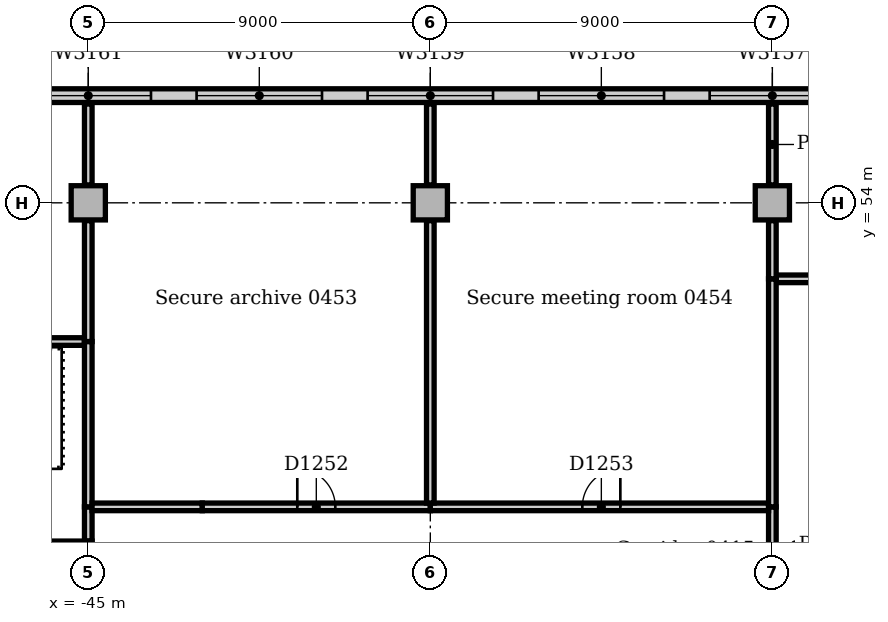
"""IFC4 building model, lengths in metres.
Left out: names, types, materials, properties, quantities, classifications, styles, units other than length and angle.
Written with IfcOpenShell. Run it as: python <this file> out.ifc"""

import sys

from ifc_helpers import new_model, si_unit, direction, frame, frame_2d, origin, origin_2d, place, context, subcontext, project, spatial, rectangle, extrude, element, fill, save


model = new_model("IFC4")
c1 = context("Model", 3, precision=1e-05, world=origin(), true_north=direction((0.0, 1.0)))
c2 = subcontext(c1, "Body", "Model", "MODEL_VIEW")
j1 = project(units=[si_unit("LENGTHUNIT", "METRE"), si_unit("PLANEANGLEUNIT", "RADIAN")], contexts=[c1])
p1 = place(None, origin())
s1 = spatial("IfcSite", under=j1, at=p1, CompositionType="ELEMENT")
p2 = place(p1, origin())
s2 = spatial("IfcBuilding", under=s1, at=p2, CompositionType="ELEMENT")
p3 = place(p2, frame((0.0, 0.0, 21.0)))
s3 = spatial("IfcBuildingStorey", under=s2, at=p3, CompositionType="ELEMENT", Elevation=21.0)
for number, where, z_axis, x_axis in (
    (1, (-45.0, 54.0, 0.0), (0.0, 0.0, 1.0), (1.0, 0.0, 0.0)),
    (2, (-36.0, 54.0, 0.0), (0.0, 0.0, 1.0), (1.0, 0.0, 0.0)),
    (3, (-27.0, 54.0, 0.0), (0.0, 0.0, 1.0), (1.0, 0.0, 0.0)),
):
    element("IfcColumn", number, at=place(p3, frame(where, z_axis=z_axis, x_axis=x_axis)), inside=s3, PredefinedType="COLUMN", context=c2, shape_type="SweptSolid", body=[
        extrude(rectangle(XDim=0.9, YDim=0.9, at=origin_2d()), origin(), (0.0, 0.0, 1.0), 4.7),
    ])
p4 = place(p3, frame((63.0, 56.82, 0.0), z_axis=(0.0, 0.0, 1.0), x_axis=(-1.0, 0.0, 0.0)))
e4 = element("IfcWall", 4, at=p4, inside=s3, PredefinedType="STANDARD", context=c2, shape_type="SweptSolid", body=[
    extrude(rectangle(XDim=144.0, YDim=0.36, at=frame_2d((72.0, 0.0))), origin(), (0.0, 0.0, 1.0), 4.85),
])
p5 = place(p4, frame((2.85, 0.0, 0.9)))
e5 = element("IfcOpeningElement", 5, at=p5, cuts=e4, PredefinedType="OPENING", context=c2, shape_type="SweptSolid", body=[
    extrude(rectangle(XDim=3.3, YDim=2.4, at=frame_2d((1.65, 1.2))), frame((0.0, 0.19, 0.0), z_axis=(0.0, -1.0, 0.0), x_axis=(1.0, 0.0, 0.0)), (0.0, 0.0, 1.0), 0.38),
])
p6 = place(p4, frame((7.35, 0.0, 0.9)))
e6 = element("IfcOpeningElement", 6, at=p6, cuts=e4, PredefinedType="OPENING", context=c2, shape_type="SweptSolid", body=[
    extrude(rectangle(XDim=3.3, YDim=2.4, at=frame_2d((1.65, 1.2))), frame((0.0, 0.19, 0.0), z_axis=(0.0, -1.0, 0.0), x_axis=(1.0, 0.0, 0.0)), (0.0, 0.0, 1.0), 0.38),
])
p7 = place(p4, frame((11.85, 0.0, 0.9)))
e7 = element("IfcOpeningElement", 7, at=p7, cuts=e4, PredefinedType="OPENING", context=c2, shape_type="SweptSolid", body=[
    extrude(rectangle(XDim=3.3, YDim=2.4, at=frame_2d((1.65, 1.2))), frame((0.0, 0.19, 0.0), z_axis=(0.0, -1.0, 0.0), x_axis=(1.0, 0.0, 0.0)), (0.0, 0.0, 1.0), 0.38),
])
p8 = place(p4, frame((16.35, 0.0, 0.9)))
e8 = element("IfcOpeningElement", 8, at=p8, cuts=e4, PredefinedType="OPENING", context=c2, shape_type="SweptSolid", body=[
    extrude(rectangle(XDim=3.3, YDim=2.4, at=frame_2d((1.65, 1.2))), frame((0.0, 0.19, 0.0), z_axis=(0.0, -1.0, 0.0), x_axis=(1.0, 0.0, 0.0)), (0.0, 0.0, 1.0), 0.38),
])
p9 = place(p4, frame((20.85, 0.0, 0.9)))
e9 = element("IfcOpeningElement", 9, at=p9, cuts=e4, PredefinedType="OPENING", context=c2, shape_type="SweptSolid", body=[
    extrude(rectangle(XDim=3.3, YDim=2.4, at=frame_2d((1.65, 1.2))), frame((0.0, 0.19, 0.0), z_axis=(0.0, -1.0, 0.0), x_axis=(1.0, 0.0, 0.0)), (0.0, 0.0, 1.0), 0.38),
])
p10 = place(p4, frame((25.35, 0.0, 0.9)))
e10 = element("IfcOpeningElement", 10, at=p10, cuts=e4, PredefinedType="OPENING", context=c2, shape_type="SweptSolid", body=[
    extrude(rectangle(XDim=3.3, YDim=2.4, at=frame_2d((1.65, 1.2))), frame((0.0, 0.19, 0.0), z_axis=(0.0, -1.0, 0.0), x_axis=(1.0, 0.0, 0.0)), (0.0, 0.0, 1.0), 0.38),
])
p11 = place(p4, frame((29.85, 0.0, 0.9)))
e11 = element("IfcOpeningElement", 11, at=p11, cuts=e4, PredefinedType="OPENING", context=c2, shape_type="SweptSolid", body=[
    extrude(rectangle(XDim=3.3, YDim=2.4, at=frame_2d((1.65, 1.2))), frame((0.0, 0.19, 0.0), z_axis=(0.0, -1.0, 0.0), x_axis=(1.0, 0.0, 0.0)), (0.0, 0.0, 1.0), 0.38),
])
p12 = place(p4, frame((34.35, 0.0, 0.9)))
e12 = element("IfcOpeningElement", 12, at=p12, cuts=e4, PredefinedType="OPENING", context=c2, shape_type="SweptSolid", body=[
    extrude(rectangle(XDim=3.3, YDim=2.4, at=frame_2d((1.65, 1.2))), frame((0.0, 0.19, 0.0), z_axis=(0.0, -1.0, 0.0), x_axis=(1.0, 0.0, 0.0)), (0.0, 0.0, 1.0), 0.38),
])
p13 = place(p4, frame((38.85, 0.0, 0.9)))
e13 = element("IfcOpeningElement", 13, at=p13, cuts=e4, PredefinedType="OPENING", context=c2, shape_type="SweptSolid", body=[
    extrude(rectangle(XDim=3.3, YDim=2.4, at=frame_2d((1.65, 1.2))), frame((0.0, 0.19, 0.0), z_axis=(0.0, -1.0, 0.0), x_axis=(1.0, 0.0, 0.0)), (0.0, 0.0, 1.0), 0.38),
])
p14 = place(p4, frame((43.35, 0.0, 0.9)))
e14 = element("IfcOpeningElement", 14, at=p14, cuts=e4, PredefinedType="OPENING", context=c2, shape_type="SweptSolid", body=[
    extrude(rectangle(XDim=3.3, YDim=2.4, at=frame_2d((1.65, 1.2))), frame((0.0, 0.19, 0.0), z_axis=(0.0, -1.0, 0.0), x_axis=(1.0, 0.0, 0.0)), (0.0, 0.0, 1.0), 0.38),
])
p15 = place(p4, frame((47.85, 0.0, 0.9)))
e15 = element("IfcOpeningElement", 15, at=p15, cuts=e4, PredefinedType="OPENING", context=c2, shape_type="SweptSolid", body=[
    extrude(rectangle(XDim=3.3, YDim=2.4, at=frame_2d((1.65, 1.2))), frame((0.0, 0.19, 0.0), z_axis=(0.0, -1.0, 0.0), x_axis=(1.0, 0.0, 0.0)), (0.0, 0.0, 1.0), 0.38),
])
p16 = place(p4, frame((52.35, 0.0, 0.9)))
e16 = element("IfcOpeningElement", 16, at=p16, cuts=e4, PredefinedType="OPENING", context=c2, shape_type="SweptSolid", body=[
    extrude(rectangle(XDim=3.3, YDim=2.4, at=frame_2d((1.65, 1.2))), frame((0.0, 0.19, 0.0), z_axis=(0.0, -1.0, 0.0), x_axis=(1.0, 0.0, 0.0)), (0.0, 0.0, 1.0), 0.38),
])
p17 = place(p4, frame((56.85, 0.0, 0.9)))
e17 = element("IfcOpeningElement", 17, at=p17, cuts=e4, PredefinedType="OPENING", context=c2, shape_type="SweptSolid", body=[
    extrude(rectangle(XDim=3.3, YDim=2.4, at=frame_2d((1.65, 1.2))), frame((0.0, 0.19, 0.0), z_axis=(0.0, -1.0, 0.0), x_axis=(1.0, 0.0, 0.0)), (0.0, 0.0, 1.0), 0.38),
])
p18 = place(p4, frame((61.35, 0.0, 0.9)))
e18 = element("IfcOpeningElement", 18, at=p18, cuts=e4, PredefinedType="OPENING", context=c2, shape_type="SweptSolid", body=[
    extrude(rectangle(XDim=3.3, YDim=2.4, at=frame_2d((1.65, 1.2))), frame((0.0, 0.19, 0.0), z_axis=(0.0, -1.0, 0.0), x_axis=(1.0, 0.0, 0.0)), (0.0, 0.0, 1.0), 0.38),
])
p19 = place(p4, frame((65.85, 0.0, 0.9)))
e19 = element("IfcOpeningElement", 19, at=p19, cuts=e4, PredefinedType="OPENING", context=c2, shape_type="SweptSolid", body=[
    extrude(rectangle(XDim=3.3, YDim=2.4, at=frame_2d((1.65, 1.2))), frame((0.0, 0.19, 0.0), z_axis=(0.0, -1.0, 0.0), x_axis=(1.0, 0.0, 0.0)), (0.0, 0.0, 1.0), 0.38),
])
p20 = place(p4, frame((70.35, 0.0, 0.9)))
e20 = element("IfcOpeningElement", 20, at=p20, cuts=e4, PredefinedType="OPENING", context=c2, shape_type="SweptSolid", body=[
    extrude(rectangle(XDim=3.3, YDim=2.4, at=frame_2d((1.65, 1.2))), frame((0.0, 0.19, 0.0), z_axis=(0.0, -1.0, 0.0), x_axis=(1.0, 0.0, 0.0)), (0.0, 0.0, 1.0), 0.38),
])
p21 = place(p4, frame((74.85, 0.0, 0.9)))
e21 = element("IfcOpeningElement", 21, at=p21, cuts=e4, PredefinedType="OPENING", context=c2, shape_type="SweptSolid", body=[
    extrude(rectangle(XDim=3.3, YDim=2.4, at=frame_2d((1.65, 1.2))), frame((0.0, 0.19, 0.0), z_axis=(0.0, -1.0, 0.0), x_axis=(1.0, 0.0, 0.0)), (0.0, 0.0, 1.0), 0.38),
])
p22 = place(p4, frame((79.35, 0.0, 0.9)))
e22 = element("IfcOpeningElement", 22, at=p22, cuts=e4, PredefinedType="OPENING", context=c2, shape_type="SweptSolid", body=[
    extrude(rectangle(XDim=3.3, YDim=2.4, at=frame_2d((1.65, 1.2))), frame((0.0, 0.19, 0.0), z_axis=(0.0, -1.0, 0.0), x_axis=(1.0, 0.0, 0.0)), (0.0, 0.0, 1.0), 0.38),
])
p23 = place(p4, frame((83.85, 0.0, 0.9)))
e23 = element("IfcOpeningElement", 23, at=p23, cuts=e4, PredefinedType="OPENING", context=c2, shape_type="SweptSolid", body=[
    extrude(rectangle(XDim=3.3, YDim=2.4, at=frame_2d((1.65, 1.2))), frame((0.0, 0.19, 0.0), z_axis=(0.0, -1.0, 0.0), x_axis=(1.0, 0.0, 0.0)), (0.0, 0.0, 1.0), 0.38),
])
p24 = place(p4, frame((88.35, 0.0, 0.9)))
e24 = element("IfcOpeningElement", 24, at=p24, cuts=e4, PredefinedType="OPENING", context=c2, shape_type="SweptSolid", body=[
    extrude(rectangle(XDim=3.3, YDim=2.4, at=frame_2d((1.65, 1.2))), frame((0.0, 0.19, 0.0), z_axis=(0.0, -1.0, 0.0), x_axis=(1.0, 0.0, 0.0)), (0.0, 0.0, 1.0), 0.38),
])
p25 = place(p4, frame((92.85, 0.0, 0.9)))
e25 = element("IfcOpeningElement", 25, at=p25, cuts=e4, PredefinedType="OPENING", context=c2, shape_type="SweptSolid", body=[
    extrude(rectangle(XDim=3.3, YDim=2.4, at=frame_2d((1.65, 1.2))), frame((0.0, 0.19, 0.0), z_axis=(0.0, -1.0, 0.0), x_axis=(1.0, 0.0, 0.0)), (0.0, 0.0, 1.0), 0.38),
])
p26 = place(p4, frame((97.35, 0.0, 0.9)))
e26 = element("IfcOpeningElement", 26, at=p26, cuts=e4, PredefinedType="OPENING", context=c2, shape_type="SweptSolid", body=[
    extrude(rectangle(XDim=3.3, YDim=2.4, at=frame_2d((1.65, 1.2))), frame((0.0, 0.19, 0.0), z_axis=(0.0, -1.0, 0.0), x_axis=(1.0, 0.0, 0.0)), (0.0, 0.0, 1.0), 0.38),
])
p27 = place(p4, frame((101.85, 0.0, 0.9)))
e27 = element("IfcOpeningElement", 27, at=p27, cuts=e4, PredefinedType="OPENING", context=c2, shape_type="SweptSolid", body=[
    extrude(rectangle(XDim=3.3, YDim=2.4, at=frame_2d((1.65, 1.2))), frame((0.0, 0.19, 0.0), z_axis=(0.0, -1.0, 0.0), x_axis=(1.0, 0.0, 0.0)), (0.0, 0.0, 1.0), 0.38),
])
p28 = place(p4, frame((106.35, 0.0, 0.9)))
e28 = element("IfcOpeningElement", 28, at=p28, cuts=e4, PredefinedType="OPENING", context=c2, shape_type="SweptSolid", body=[
    extrude(rectangle(XDim=3.3, YDim=2.4, at=frame_2d((1.65, 1.2))), frame((0.0, 0.19, 0.0), z_axis=(0.0, -1.0, 0.0), x_axis=(1.0, 0.0, 0.0)), (0.0, 0.0, 1.0), 0.38),
])
p29 = place(p4, frame((110.85, 0.0, 0.9)))
e29 = element("IfcOpeningElement", 29, at=p29, cuts=e4, PredefinedType="OPENING", context=c2, shape_type="SweptSolid", body=[
    extrude(rectangle(XDim=3.3, YDim=2.4, at=frame_2d((1.65, 1.2))), frame((0.0, 0.19, 0.0), z_axis=(0.0, -1.0, 0.0), x_axis=(1.0, 0.0, 0.0)), (0.0, 0.0, 1.0), 0.38),
])
p30 = place(p4, frame((115.35, 0.0, 0.9)))
e30 = element("IfcOpeningElement", 30, at=p30, cuts=e4, PredefinedType="OPENING", context=c2, shape_type="SweptSolid", body=[
    extrude(rectangle(XDim=3.3, YDim=2.4, at=frame_2d((1.65, 1.2))), frame((0.0, 0.19, 0.0), z_axis=(0.0, -1.0, 0.0), x_axis=(1.0, 0.0, 0.0)), (0.0, 0.0, 1.0), 0.38),
])
p31 = place(p4, frame((119.85, 0.0, 0.9)))
e31 = element("IfcOpeningElement", 31, at=p31, cuts=e4, PredefinedType="OPENING", context=c2, shape_type="SweptSolid", body=[
    extrude(rectangle(XDim=3.3, YDim=2.4, at=frame_2d((1.65, 1.2))), frame((0.0, 0.19, 0.0), z_axis=(0.0, -1.0, 0.0), x_axis=(1.0, 0.0, 0.0)), (0.0, 0.0, 1.0), 0.38),
])
p32 = place(p4, frame((124.35, 0.0, 0.9)))
e32 = element("IfcOpeningElement", 32, at=p32, cuts=e4, PredefinedType="OPENING", context=c2, shape_type="SweptSolid", body=[
    extrude(rectangle(XDim=3.3, YDim=2.4, at=frame_2d((1.65, 1.2))), frame((0.0, 0.19, 0.0), z_axis=(0.0, -1.0, 0.0), x_axis=(1.0, 0.0, 0.0)), (0.0, 0.0, 1.0), 0.38),
])
p33 = place(p4, frame((128.85, 0.0, 0.9)))
e33 = element("IfcOpeningElement", 33, at=p33, cuts=e4, PredefinedType="OPENING", context=c2, shape_type="SweptSolid", body=[
    extrude(rectangle(XDim=3.3, YDim=2.4, at=frame_2d((1.65, 1.2))), frame((0.0, 0.19, 0.0), z_axis=(0.0, -1.0, 0.0), x_axis=(1.0, 0.0, 0.0)), (0.0, 0.0, 1.0), 0.38),
])
p34 = place(p4, frame((133.35, 0.0, 0.9)))
e34 = element("IfcOpeningElement", 34, at=p34, cuts=e4, PredefinedType="OPENING", context=c2, shape_type="SweptSolid", body=[
    extrude(rectangle(XDim=3.3, YDim=2.4, at=frame_2d((1.65, 1.2))), frame((0.0, 0.19, 0.0), z_axis=(0.0, -1.0, 0.0), x_axis=(1.0, 0.0, 0.0)), (0.0, 0.0, 1.0), 0.38),
])
p35 = place(p4, frame((137.85, 0.0, 0.9)))
e35 = element("IfcOpeningElement", 35, at=p35, cuts=e4, PredefinedType="OPENING", context=c2, shape_type="SweptSolid", body=[
    extrude(rectangle(XDim=3.3, YDim=2.4, at=frame_2d((1.65, 1.2))), frame((0.0, 0.19, 0.0), z_axis=(0.0, -1.0, 0.0), x_axis=(1.0, 0.0, 0.0)), (0.0, 0.0, 1.0), 0.38),
])
p36 = place(p3, frame((-45.0, 45.1, 0.0), z_axis=(0.0, 0.0, 1.0), x_axis=(0.0, 1.0, 0.0)))
e36 = element("IfcWall", 36, at=p36, inside=s3, PredefinedType="SOLIDWALL", context=c2, shape_type="SweptSolid", body=[
    extrude(rectangle(XDim=0.9, YDim=0.2, at=frame_2d((0.45, 0.0))), origin(), (0.0, 0.0, 1.0), 4.7),
])
p37 = place(p3, frame((-54.0, 45.0, 0.0), z_axis=(0.0, 0.0, 1.0), x_axis=(1.0, 0.0, 0.0)))
e37 = element("IfcWall", 37, at=p37, inside=s3, PredefinedType="SOLIDWALL", context=c2, shape_type="SweptSolid", body=[
    extrude(rectangle(XDim=9.1, YDim=0.2, at=frame_2d((4.55, 0.0))), origin(), (0.0, 0.0, 1.0), 4.85),
])
p38 = place(p37, frame((0.8, 0.0, 0.0)))
e38 = element("IfcOpeningElement", 38, at=p38, cuts=e37, PredefinedType="OPENING", context=c2, shape_type="SweptSolid", body=[
    extrude(rectangle(XDim=1.2, YDim=2.1, at=frame_2d((0.6, 1.05))), frame((0.0, 0.11, 0.0), z_axis=(0.0, -1.0, 0.0), x_axis=(1.0, 0.0, 0.0)), (0.0, 0.0, 1.0), 0.22),
])
p39 = place(p3, frame((-54.1, 50.35, 0.0), z_axis=(0.0, 0.0, 1.0), x_axis=(1.0, 0.0, 0.0)))
e39 = element("IfcWall", 39, at=p39, inside=s3, PredefinedType="SOLIDWALL", context=c2, shape_type="SweptSolid", body=[
    extrude(rectangle(XDim=9.0, YDim=0.2, at=frame_2d((4.5, 0.0))), origin(), (0.0, 0.0, 1.0), 4.7),
])
p40 = place(p3, frame((-45.0, 46.0, 0.0), z_axis=(0.0, 0.0, 1.0), x_axis=(0.0, 1.0, 0.0)))
e40 = element("IfcWall", 40, at=p40, inside=s3, PredefinedType="SOLIDWALL", context=c2, shape_type="SweptSolid", body=[
    extrude(rectangle(XDim=4.35, YDim=0.2, at=frame_2d((2.175, 0.0))), origin(), (0.0, 0.0, 1.0), 4.7),
])
p41 = place(p3, frame((-44.9, 46.0, 0.0), z_axis=(0.0, 0.0, 1.0), x_axis=(1.0, 0.0, 0.0)))
e41 = element("IfcWall", 41, at=p41, inside=s3, PredefinedType="PARTITIONING", context=c2, shape_type="SweptSolid", body=[
    extrude(rectangle(XDim=2.9, YDim=0.2, at=frame_2d((1.45, 0.0))), origin(), (0.0, 0.0, 1.0), 4.7),
])
p42 = place(p3, frame((-27.0, 45.0, 0.0), z_axis=(0.0, 0.0, 1.0), x_axis=(0.0, 1.0, 0.0)))
e42 = element("IfcWall", 42, at=p42, inside=s3, PredefinedType="PARTITIONING", context=c2, shape_type="SweptSolid", body=[
    extrude(rectangle(XDim=1.0, YDim=0.2, at=frame_2d((0.5, 0.0))), origin(), (0.0, 0.0, 1.0), 4.7),
])
p43 = place(p3, frame((-42.0, 46.0, 0.0), z_axis=(0.0, 0.0, 1.0), x_axis=(1.0, 0.0, 0.0)))
e43 = element("IfcWall", 43, at=p43, inside=s3, PredefinedType="PARTITIONING", context=c2, shape_type="SweptSolid", body=[
    extrude(rectangle(XDim=6.0, YDim=0.2, at=frame_2d((3.0, 0.0))), origin(), (0.0, 0.0, 1.0), 4.7),
])
p44 = place(p43, frame((2.5, 0.0, 0.0)))
e44 = element("IfcOpeningElement", 44, at=p44, cuts=e43, PredefinedType="OPENING", context=c2, shape_type="SweptSolid", body=[
    extrude(rectangle(XDim=1.0, YDim=2.1, at=frame_2d((0.5, 1.05))), frame((0.0, 0.11, 0.0), z_axis=(0.0, -1.0, 0.0), x_axis=(1.0, 0.0, 0.0)), (0.0, 0.0, 1.0), 0.22),
])
p45 = place(p3, frame((-36.0, 46.0, 0.0), z_axis=(0.0, 0.0, 1.0), x_axis=(1.0, 0.0, 0.0)))
e45 = element("IfcWall", 45, at=p45, inside=s3, PredefinedType="PARTITIONING", context=c2, shape_type="SweptSolid", body=[
    extrude(rectangle(XDim=8.9, YDim=0.2, at=frame_2d((4.45, 0.0))), origin(), (0.0, 0.0, 1.0), 4.7),
])
p46 = place(p45, frame((4.0, 0.0, 0.0)))
e46 = element("IfcOpeningElement", 46, at=p46, cuts=e45, PredefinedType="OPENING", context=c2, shape_type="SweptSolid", body=[
    extrude(rectangle(XDim=1.0, YDim=2.1, at=frame_2d((0.5, 1.05))), frame((0.0, 0.11, 0.0), z_axis=(0.0, -1.0, 0.0), x_axis=(1.0, 0.0, 0.0)), (0.0, 0.0, 1.0), 0.22),
])
p47 = place(p3, frame((-26.9, 52.0, 0.0), z_axis=(0.0, 0.0, 1.0), x_axis=(1.0, 0.0, 0.0)))
e47 = element("IfcWall", 47, at=p47, inside=s3, PredefinedType="PARTITIONING", context=c2, shape_type="SweptSolid", body=[
    extrude(rectangle(XDim=8.9, YDim=0.2, at=frame_2d((4.45, 0.0))), origin(), (0.0, 0.0, 1.0), 4.7),
])
p48 = place(p47, frame((3.9, 0.0, 0.0)))
e48 = element("IfcOpeningElement", 48, at=p48, cuts=e47, PredefinedType="OPENING", context=c2, shape_type="SweptSolid", body=[
    extrude(rectangle(XDim=1.0, YDim=2.1, at=frame_2d((0.5, 1.05))), frame((0.0, 0.11, 0.0), z_axis=(0.0, -1.0, 0.0), x_axis=(1.0, 0.0, 0.0)), (0.0, 0.0, 1.0), 0.22),
])
p49 = place(p3, frame((-27.0, 46.0, 0.0), z_axis=(0.0, 0.0, 1.0), x_axis=(0.0, 1.0, 0.0)))
e49 = element("IfcWall", 49, at=p49, inside=s3, PredefinedType="PARTITIONING", context=c2, shape_type="SweptSolid", body=[
    extrude(rectangle(XDim=6.0, YDim=0.2, at=frame_2d((3.0, 0.0))), origin(), (0.0, 0.0, 1.0), 4.7),
])
p50 = place(p3, frame((-27.0, 52.0, 0.0), z_axis=(0.0, 0.0, 1.0), x_axis=(0.0, 1.0, 0.0)))
e50 = element("IfcWall", 50, at=p50, inside=s3, PredefinedType="PARTITIONING", context=c2, shape_type="SweptSolid", body=[
    extrude(rectangle(XDim=1.53, YDim=0.2, at=frame_2d((0.765, 0.0))), origin(), (0.0, 0.0, 1.0), 4.7),
])
p51 = place(p3, frame((-27.0, 54.47, 0.0), z_axis=(0.0, 0.0, 1.0), x_axis=(0.0, 1.0, 0.0)))
e51 = element("IfcWall", 51, at=p51, inside=s3, PredefinedType="PARTITIONING", context=c2, shape_type="SweptSolid", body=[
    extrude(rectangle(XDim=2.13, YDim=0.2, at=frame_2d((1.065, 0.0))), origin(), (0.0, 0.0, 1.0), 4.7),
])
p52 = place(p3, frame((-45.0, 50.35, 0.0), z_axis=(0.0, 0.0, 1.0), x_axis=(0.0, 1.0, 0.0)))
e52 = element("IfcWall", 52, at=p52, inside=s3, PredefinedType="PARTITIONING", context=c2, shape_type="SweptSolid", body=[
    extrude(rectangle(XDim=3.18, YDim=0.2, at=frame_2d((1.59, 0.0))), origin(), (0.0, 0.0, 1.0), 4.7),
])
p53 = place(p3, frame((-45.0, 54.47, 0.0), z_axis=(0.0, 0.0, 1.0), x_axis=(0.0, 1.0, 0.0)))
e53 = element("IfcWall", 53, at=p53, inside=s3, PredefinedType="PARTITIONING", context=c2, shape_type="SweptSolid", body=[
    extrude(rectangle(XDim=2.13, YDim=0.2, at=frame_2d((1.065, 0.0))), origin(), (0.0, 0.0, 1.0), 4.7),
])
p54 = place(p3, frame((-36.0, 46.1, 0.0), z_axis=(0.0, 0.0, 1.0), x_axis=(0.0, 1.0, 0.0)))
e54 = element("IfcWall", 54, at=p54, inside=s3, PredefinedType="PARTITIONING", context=c2, shape_type="SweptSolid", body=[
    extrude(rectangle(XDim=7.43, YDim=0.2, at=frame_2d((3.715, 0.0))), origin(), (0.0, 0.0, 1.0), 4.7),
])
p55 = place(p3, frame((-36.0, 54.47, 0.0), z_axis=(0.0, 0.0, 1.0), x_axis=(0.0, 1.0, 0.0)))
e55 = element("IfcWall", 55, at=p55, inside=s3, PredefinedType="PARTITIONING", context=c2, shape_type="SweptSolid", body=[
    extrude(rectangle(XDim=2.13, YDim=0.2, at=frame_2d((1.065, 0.0))), origin(), (0.0, 0.0, 1.0), 4.7),
])
p56 = place(p24, origin())
e56 = element("IfcWindow", 56, at=p56, inside=s3, PartitioningType="SINGLE_PANEL", PredefinedType="WINDOW", context=c2, shape_type="SweptSolid", body=[
    extrude(rectangle(XDim=3.3, YDim=2.4, at=frame_2d((1.65, 1.2))), frame((0.0, 0.13, 0.0), z_axis=(0.0, -1.0, 0.0), x_axis=(1.0, 0.0, 0.0)), (0.0, 0.0, 1.0), 0.06),
])
fill(e24, e56)
p57 = place(p25, origin())
e57 = element("IfcWindow", 57, at=p57, inside=s3, PartitioningType="SINGLE_PANEL", PredefinedType="WINDOW", context=c2, shape_type="SweptSolid", body=[
    extrude(rectangle(XDim=3.3, YDim=2.4, at=frame_2d((1.65, 1.2))), frame((0.0, 0.13, 0.0), z_axis=(0.0, -1.0, 0.0), x_axis=(1.0, 0.0, 0.0)), (0.0, 0.0, 1.0), 0.06),
])
fill(e25, e57)
p58 = place(p26, origin())
e58 = element("IfcWindow", 58, at=p58, inside=s3, PartitioningType="SINGLE_PANEL", PredefinedType="WINDOW", context=c2, shape_type="SweptSolid", body=[
    extrude(rectangle(XDim=3.3, YDim=2.4, at=frame_2d((1.65, 1.2))), frame((0.0, 0.13, 0.0), z_axis=(0.0, -1.0, 0.0), x_axis=(1.0, 0.0, 0.0)), (0.0, 0.0, 1.0), 0.06),
])
fill(e26, e58)
p59 = place(p27, origin())
e59 = element("IfcWindow", 59, at=p59, inside=s3, PartitioningType="SINGLE_PANEL", PredefinedType="WINDOW", context=c2, shape_type="SweptSolid", body=[
    extrude(rectangle(XDim=3.3, YDim=2.4, at=frame_2d((1.65, 1.2))), frame((0.0, 0.13, 0.0), z_axis=(0.0, -1.0, 0.0), x_axis=(1.0, 0.0, 0.0)), (0.0, 0.0, 1.0), 0.06),
])
fill(e27, e59)
p60 = place(p28, origin())
e60 = element("IfcWindow", 60, at=p60, inside=s3, PartitioningType="SINGLE_PANEL", PredefinedType="WINDOW", context=c2, shape_type="SweptSolid", body=[
    extrude(rectangle(XDim=3.3, YDim=2.4, at=frame_2d((1.65, 1.2))), frame((0.0, 0.13, 0.0), z_axis=(0.0, -1.0, 0.0), x_axis=(1.0, 0.0, 0.0)), (0.0, 0.0, 1.0), 0.06),
])
fill(e28, e60)
p61 = place(p44, origin())
e61 = element("IfcDoor", 61, at=p61, inside=s3, OperationType="SINGLE_SWING_LEFT", PredefinedType="DOOR", context=c2, shape_type="SweptSolid", body=[
    extrude(rectangle(XDim=1.0, YDim=2.1, at=frame_2d((0.5, 1.05))), frame((0.0, 0.025, 0.0), z_axis=(0.0, -1.0, 0.0), x_axis=(1.0, 0.0, 0.0)), (0.0, 0.0, 1.0), 0.05),
])
fill(e44, e61)
p62 = place(p46, origin())
e62 = element("IfcDoor", 62, at=p62, inside=s3, OperationType="SINGLE_SWING_RIGHT", PredefinedType="DOOR", context=c2, shape_type="SweptSolid", body=[
    extrude(rectangle(XDim=1.0, YDim=2.1, at=frame_2d((0.5, 1.05))), frame((0.0, 0.025, 0.0), z_axis=(0.0, -1.0, 0.0), x_axis=(1.0, 0.0, 0.0)), (0.0, 0.0, 1.0), 0.05),
])
fill(e46, e62)
save(model, sys.argv[1])
